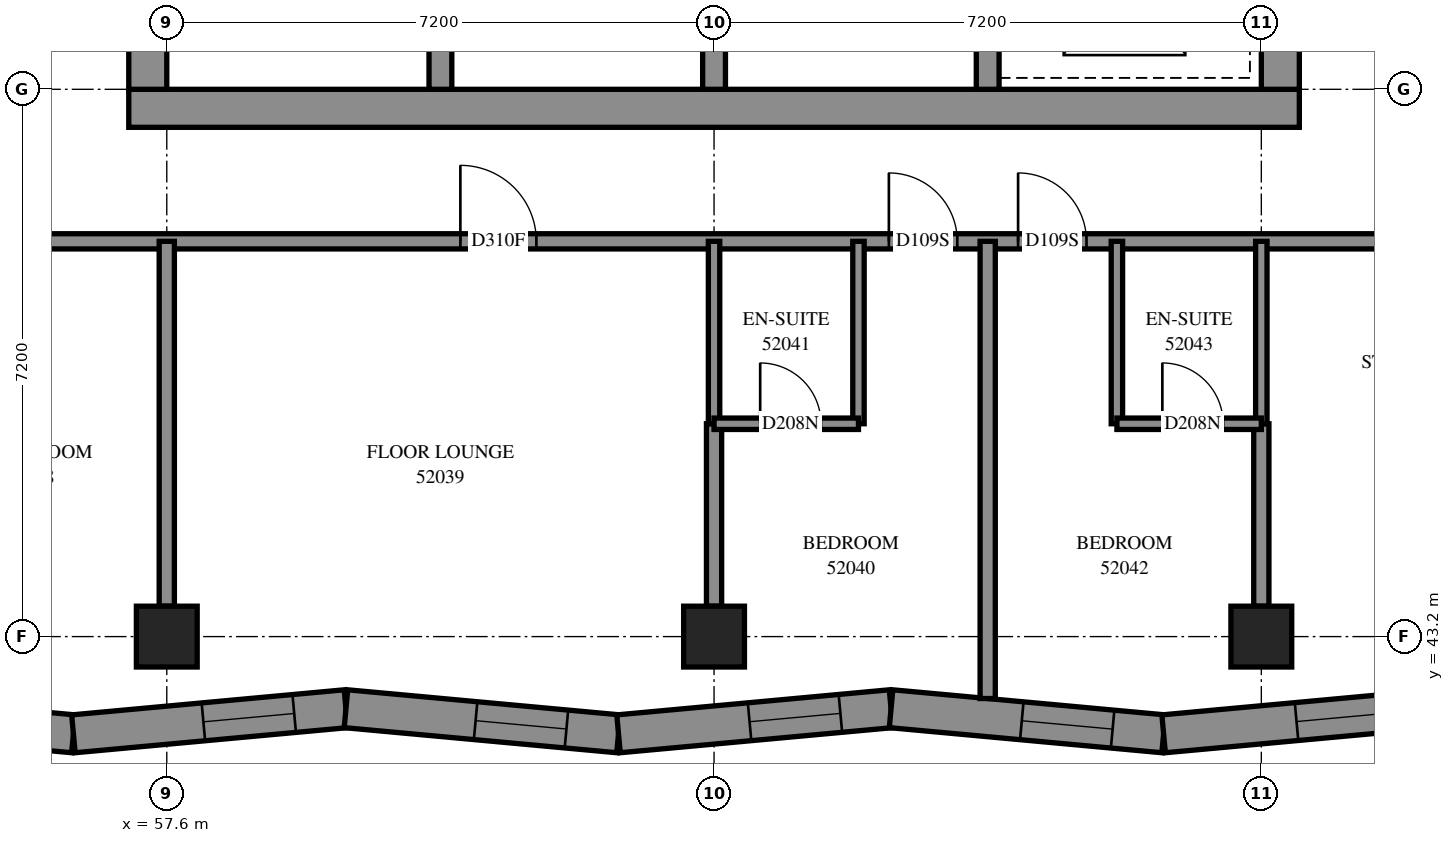
"""IFC4 building model, lengths in metres.
Left out: names, types, materials, properties, quantities, classifications, styles, units other than length and angle.
Written with IfcOpenShell. Run it as: python <this file> out.ifc"""

import sys

from ifc_helpers import new_model, si_unit, direction, frame, frame_2d, origin, origin_2d, place, context, subcontext, project, spatial, polyline, rectangle, outline, extrude, element, fill, save


model = new_model("IFC4")
c1 = context("Model", 3, precision=1e-05, world=origin(), true_north=direction((0.0, 1.0)))
c2 = subcontext(c1, "Body", "Model", "MODEL_VIEW")
j1 = project(units=[si_unit("LENGTHUNIT", "METRE"), si_unit("PLANEANGLEUNIT", "RADIAN")], contexts=[c1])
p1 = place(None, origin())
s1 = spatial("IfcSite", under=j1, at=p1, CompositionType="ELEMENT")
p2 = place(p1, origin())
s2 = spatial("IfcBuilding", under=s1, at=p2, CompositionType="ELEMENT")
p3 = place(p2, frame((0.0, 0.0, 193.0)))
s3 = spatial("IfcBuildingStorey", under=s2, at=p3, CompositionType="ELEMENT", Elevation=193.0)
for number, where, z_axis, x_axis in (
    (1, (57.6, 43.2, 0.0), (0.0, 0.0, 1.0), (1.0, 0.0, 0.0)),
    (2, (64.8, 43.2, 0.0), (0.0, 0.0, 1.0), (1.0, 0.0, 0.0)),
    (3, (72.0, 43.2, 0.0), (0.0, 0.0, 1.0), (1.0, 0.0, 0.0)),
):
    element("IfcColumn", number, at=place(p3, frame(where, z_axis=z_axis, x_axis=x_axis)), inside=s3, PredefinedType="COLUMN", context=c2, shape_type="SweptSolid", body=[
        extrude(rectangle(XDim=0.8, YDim=0.8, at=origin_2d()), origin(), (0.0, 0.0, 1.0), 3.1),
    ])
p4 = place(p3, frame((57.1, 50.15, -0.3), z_axis=(0.0, 0.0, 1.0), x_axis=(1.0, 0.0, 0.0)))
e4 = element("IfcWall", 4, at=p4, inside=s3, PredefinedType="SHEAR", context=c2, shape_type="SweptSolid", body=[
    extrude(rectangle(XDim=15.4, YDim=0.5, at=frame_2d((7.7, 0.0))), origin(), (0.0, 0.0, 1.0), 2.7),
])
p5 = place(p3, frame((57.35, 50.4, -0.3), z_axis=(0.0, 0.0, 1.0), x_axis=(0.0, 1.0, 0.0)))
e5 = element("IfcWall", 5, at=p5, inside=s3, PredefinedType="SHEAR", context=c2, shape_type="SweptSolid", body=[
    extrude(rectangle(XDim=14.4, YDim=0.5, at=frame_2d((7.2, 0.0))), origin(), (0.0, 0.0, 1.0), 2.7),
])
p6 = place(p5, frame((4.55, 0.0, 0.3)))
e6 = element("IfcOpeningElement", 6, at=p6, cuts=e5, PredefinedType="OPENING", context=c2, shape_type="SweptSolid", body=[
    extrude(rectangle(XDim=1.1, YDim=2.1, at=frame_2d((0.55, 1.05))), frame((0.0, 0.26, 0.0), z_axis=(0.0, -1.0, 0.0), x_axis=(1.0, 0.0, 0.0)), (0.0, 0.0, 1.0), 0.52),
])
p7 = place(p5, frame((11.35, 0.0, 0.3)))
e7 = element("IfcOpeningElement", 7, at=p7, cuts=e5, PredefinedType="OPENING", context=c2, shape_type="SweptSolid", body=[
    extrude(rectangle(XDim=1.1, YDim=2.1, at=frame_2d((0.55, 1.05))), frame((0.0, 0.26, 0.0), z_axis=(0.0, -1.0, 0.0), x_axis=(1.0, 0.0, 0.0)), (0.0, 0.0, 1.0), 0.52),
])
p8 = place(p3, frame((72.25, 50.4, -0.3), z_axis=(0.0, 0.0, 1.0), x_axis=(0.0, 1.0, 0.0)))
e8 = element("IfcWall", 8, at=p8, inside=s3, PredefinedType="SHEAR", context=c2, shape_type="SweptSolid", body=[
    extrude(rectangle(XDim=14.4, YDim=0.5, at=frame_2d((7.2, 0.0))), origin(), (0.0, 0.0, 1.0), 2.7),
])
p9 = place(p8, frame((4.55, 0.0, 0.3)))
e9 = element("IfcOpeningElement", 9, at=p9, cuts=e8, PredefinedType="OPENING", context=c2, shape_type="SweptSolid", body=[
    extrude(rectangle(XDim=1.1, YDim=2.1, at=frame_2d((0.55, 1.05))), frame((0.0, 0.26, 0.0), z_axis=(0.0, -1.0, 0.0), x_axis=(1.0, 0.0, 0.0)), (0.0, 0.0, 1.0), 0.52),
])
p10 = place(p8, frame((11.35, 0.0, 0.3)))
e10 = element("IfcOpeningElement", 10, at=p10, cuts=e8, PredefinedType="OPENING", context=c2, shape_type="SweptSolid", body=[
    extrude(rectangle(XDim=1.1, YDim=2.1, at=frame_2d((0.55, 1.05))), frame((0.0, 0.26, 0.0), z_axis=(0.0, -1.0, 0.0), x_axis=(1.0, 0.0, 0.0)), (0.0, 0.0, 1.0), 0.52),
])
for number, where, z_axis, x_axis in (
    (11, (61.2, 50.4, 0.0), (0.0, 0.0, 1.0), (0.0, 1.0, 0.0)),
    (12, (64.8, 50.4, 0.0), (0.0, 0.0, 1.0), (0.0, 1.0, 0.0)),
    (13, (68.4, 50.4, 0.0), (0.0, 0.0, 1.0), (0.0, 1.0, 0.0)),
):
    element("IfcWall", number, at=place(p3, frame(where, z_axis=z_axis, x_axis=x_axis)), inside=s3, PredefinedType="SOLIDWALL", context=c2, shape_type="SweptSolid", body=[
        extrude(rectangle(XDim=3.3, YDim=0.3, at=frame_2d((1.65, 0.0))), origin(), (0.0, 0.0, 1.0), 3.1),
    ])
p11 = place(p3, frame((52.765, 42.253, 0.0), z_axis=(0.0, 0.0, 1.0), x_axis=(0.9957941627, -0.0916186959, 0.0)))
e14 = element("IfcWall", 14, at=p11, inside=s3, PredefinedType="SOLIDWALL", context=c2, shape_type="SweptSolid", body=[
    extrude(outline(polyline([(0.044, -0.25), (3.644, -0.25), (3.599, 0.25), (-0.044, 0.25), (0.044, -0.25)])), origin(), (0.0, 0.0, 1.0), 3.1),
])
p12 = place(p11, frame((1.719, 0.0, 0.45)))
e15 = element("IfcOpeningElement", 15, at=p12, cuts=e14, PredefinedType="OPENING", context=c2, shape_type="SweptSolid", body=[
    extrude(rectangle(XDim=1.2, YDim=2.5, at=frame_2d((0.6, 1.25))), frame((0.0, 0.26, 0.0), z_axis=(0.0, -1.0, 0.0), x_axis=(1.0, 0.0, 0.0)), (0.0, 0.0, 1.0), 0.52),
])
p13 = place(p3, frame((56.371, 41.921, 0.0), z_axis=(0.0, 0.0, 1.0), x_axis=(0.9957917474, 0.0916449443, 0.0)))
e16 = element("IfcWall", 16, at=p13, inside=s3, PredefinedType="SOLIDWALL", context=c2, shape_type="SweptSolid", body=[
    extrude(outline(polyline([(-0.023, -0.25), (3.578, -0.25), (3.624, 0.25), (0.023, 0.25), (-0.023, -0.25)])), origin(), (0.0, 0.0, 1.0), 3.1),
])
p14 = place(p13, frame((1.717, 0.0, 0.45)))
e17 = element("IfcOpeningElement", 17, at=p14, cuts=e16, PredefinedType="OPENING", context=c2, shape_type="SweptSolid", body=[
    extrude(rectangle(XDim=1.2, YDim=2.5, at=frame_2d((0.6, 1.25))), frame((0.0, 0.26, 0.0), z_axis=(0.0, -1.0, 0.0), x_axis=(1.0, 0.0, 0.0)), (0.0, 0.0, 1.0), 0.52),
])
p15 = place(p3, frame((59.957, 42.251, 0.0), z_axis=(0.0, 0.0, 1.0), x_axis=(0.9957917474, -0.0916449443, 0.0)))
e18 = element("IfcWall", 18, at=p15, inside=s3, PredefinedType="SOLIDWALL", context=c2, shape_type="SweptSolid", body=[
    extrude(outline(polyline([(0.023, -0.25), (3.624, -0.25), (3.578, 0.25), (-0.023, 0.25), (0.023, -0.25)])), origin(), (0.0, 0.0, 1.0), 3.1),
])
p16 = place(p15, frame((1.713, 0.0, 0.45)))
e19 = element("IfcOpeningElement", 19, at=p16, cuts=e18, PredefinedType="OPENING", context=c2, shape_type="SweptSolid", body=[
    extrude(rectangle(XDim=1.2, YDim=2.5, at=frame_2d((0.6, 1.25))), frame((0.0, 0.26, 0.0), z_axis=(0.0, -1.0, 0.0), x_axis=(1.0, 0.0, 0.0)), (0.0, 0.0, 1.0), 0.52),
])
p17 = place(p3, frame((63.543, 41.921, 0.0), z_axis=(0.0, 0.0, 1.0), x_axis=(0.9957919806, 0.09164241, 0.0)))
e20 = element("IfcWall", 20, at=p17, inside=s3, PredefinedType="SOLIDWALL", context=c2, shape_type="SweptSolid", body=[
    extrude(outline(polyline([(-0.023, -0.25), (3.578, -0.25), (3.624, 0.25), (0.023, 0.25), (-0.023, -0.25)])), origin(), (0.0, 0.0, 1.0), 3.1),
])
p18 = place(p17, frame((1.732, 0.0, 0.45)))
e21 = element("IfcOpeningElement", 21, at=p18, cuts=e20, PredefinedType="OPENING", context=c2, shape_type="SweptSolid", body=[
    extrude(rectangle(XDim=1.2, YDim=2.5, at=frame_2d((0.6, 1.25))), frame((0.0, 0.26, 0.0), z_axis=(0.0, -1.0, 0.0), x_axis=(1.0, 0.0, 0.0)), (0.0, 0.0, 1.0), 0.52),
])
p19 = place(p3, frame((67.129, 42.251, 0.0), z_axis=(0.0, 0.0, 1.0), x_axis=(0.9957917474, -0.0916449443, 0.0)))
e22 = element("IfcWall", 22, at=p19, inside=s3, PredefinedType="SOLIDWALL", context=c2, shape_type="SweptSolid", body=[
    extrude(outline(polyline([(0.023, -0.25), (3.624, -0.25), (3.578, 0.25), (-0.023, 0.25), (0.023, -0.25)])), origin(), (0.0, 0.0, 1.0), 3.1),
])
p20 = place(p19, frame((1.727, 0.0, 0.45)))
e23 = element("IfcOpeningElement", 23, at=p20, cuts=e22, PredefinedType="OPENING", context=c2, shape_type="SweptSolid", body=[
    extrude(rectangle(XDim=1.2, YDim=2.5, at=frame_2d((0.6, 1.25))), frame((0.0, 0.26, 0.0), z_axis=(0.0, -1.0, 0.0), x_axis=(1.0, 0.0, 0.0)), (0.0, 0.0, 1.0), 0.52),
])
p21 = place(p3, frame((70.714, 41.921, 0.0), z_axis=(0.0, 0.0, 1.0), x_axis=(0.9957941627, 0.0916186959, 0.0)))
e24 = element("IfcWall", 24, at=p21, inside=s3, PredefinedType="SOLIDWALL", context=c2, shape_type="SweptSolid", body=[
    extrude(outline(polyline([(-0.023, -0.25), (3.578, -0.25), (3.665, 0.25), (0.023, 0.25), (-0.023, -0.25)])), origin(), (0.0, 0.0, 1.0), 3.1),
])
p22 = place(p21, frame((1.756, 0.0, 0.45)))
e25 = element("IfcOpeningElement", 25, at=p22, cuts=e24, PredefinedType="OPENING", context=c2, shape_type="SweptSolid", body=[
    extrude(rectangle(XDim=1.2, YDim=2.5, at=frame_2d((0.6, 1.25))), frame((0.0, 0.26, 0.0), z_axis=(0.0, -1.0, 0.0), x_axis=(1.0, 0.0, 0.0)), (0.0, 0.0, 1.0), 0.52),
])
p23 = place(p3, frame((55.6, 48.4, 0.0), z_axis=(0.0, 0.0, 1.0), x_axis=(1.0, 0.0, 0.0)))
e26 = element("IfcWall", 26, at=p23, inside=s3, PredefinedType="PARTITIONING", context=c2, shape_type="SweptSolid", body=[
    extrude(rectangle(XDim=18.4, YDim=0.2, at=frame_2d((9.2, 0.0))), origin(), (0.0, 0.0, 1.0), 3.1),
])
p24 = place(p23, frame((5.862, 0.0, 0.0)))
e27 = element("IfcOpeningElement", 27, at=p24, cuts=e26, PredefinedType="OPENING", context=c2, shape_type="SweptSolid", body=[
    extrude(rectangle(XDim=1.0, YDim=2.1, at=frame_2d((0.5, 1.05))), frame((0.0, 0.11, 0.0), z_axis=(0.0, -1.0, 0.0), x_axis=(1.0, 0.0, 0.0)), (0.0, 0.0, 1.0), 0.22),
])
p25 = place(p23, frame((11.5, 0.0, 0.0)))
e28 = element("IfcOpeningElement", 28, at=p25, cuts=e26, PredefinedType="OPENING", context=c2, shape_type="SweptSolid", body=[
    extrude(rectangle(XDim=0.9, YDim=2.1, at=frame_2d((0.45, 1.05))), frame((0.0, 0.11, 0.0), z_axis=(0.0, -1.0, 0.0), x_axis=(1.0, 0.0, 0.0)), (0.0, 0.0, 1.0), 0.22),
])
p26 = place(p23, frame((13.2, 0.0, 0.0)))
e29 = element("IfcOpeningElement", 29, at=p26, cuts=e26, PredefinedType="OPENING", context=c2, shape_type="SweptSolid", body=[
    extrude(rectangle(XDim=0.9, YDim=2.1, at=frame_2d((0.45, 1.05))), frame((0.0, 0.11, 0.0), z_axis=(0.0, -1.0, 0.0), x_axis=(1.0, 0.0, 0.0)), (0.0, 0.0, 1.0), 0.22),
])
p27 = place(p3, frame((68.4, 42.385, 0.0), z_axis=(0.0, 0.0, 1.0), x_axis=(0.0, 1.0, 0.0)))
e30 = element("IfcWall", 30, at=p27, inside=s3, PredefinedType="PARTITIONING", context=c2, shape_type="SweptSolid", body=[
    extrude(rectangle(XDim=6.015, YDim=0.2, at=frame_2d((3.007, 0.0))), origin(), (0.0, 0.0, 1.0), 3.1),
])
p28 = place(p3, frame((57.6, 43.6, 0.0), z_axis=(0.0, 0.0, 1.0), x_axis=(0.0, 1.0, 0.0)))
e31 = element("IfcWall", 31, at=p28, inside=s3, PredefinedType="PARTITIONING", context=c2, shape_type="SweptSolid", body=[
    extrude(rectangle(XDim=4.8, YDim=0.2, at=frame_2d((2.4, 0.0))), origin(), (0.0, 0.0, 1.0), 3.1),
])
p29 = place(p3, frame((64.8, 43.6, 0.0), z_axis=(0.0, 0.0, 1.0), x_axis=(0.0, 1.0, 0.0)))
e32 = element("IfcWall", 32, at=p29, inside=s3, PredefinedType="PARTITIONING", context=c2, shape_type="SweptSolid", body=[
    extrude(rectangle(XDim=2.4, YDim=0.2, at=frame_2d((1.2, 0.0))), origin(), (0.0, 0.0, 1.0), 3.1),
])
for number, where, z_axis, x_axis in (
    (33, (66.7, 46.0, 0.0), (0.0, 0.0, 1.0), (0.0, 1.0, 0.0)),
    (34, (64.8, 46.0, 0.0), (0.0, 0.0, 1.0), (0.0, 1.0, 0.0)),
    (35, (70.1, 46.0, 0.0), (0.0, 0.0, 1.0), (0.0, 1.0, 0.0)),
):
    element("IfcWall", number, at=place(p3, frame(where, z_axis=z_axis, x_axis=x_axis)), inside=s3, PredefinedType="PARTITIONING", context=c2, shape_type="SweptSolid", body=[
        extrude(rectangle(XDim=2.4, YDim=0.15, at=frame_2d((1.2, 0.0))), origin(), (0.0, 0.0, 1.0), 3.1),
    ])
p30 = place(p3, frame((72.0, 43.6, 0.0), z_axis=(0.0, 0.0, 1.0), x_axis=(0.0, 1.0, 0.0)))
e36 = element("IfcWall", 36, at=p30, inside=s3, PredefinedType="PARTITIONING", context=c2, shape_type="SweptSolid", body=[
    extrude(rectangle(XDim=2.4, YDim=0.2, at=frame_2d((1.2, 0.0))), origin(), (0.0, 0.0, 1.0), 3.1),
])
p31 = place(p3, frame((72.0, 46.0, 0.0), z_axis=(0.0, 0.0, 1.0), x_axis=(0.0, 1.0, 0.0)))
e37 = element("IfcWall", 37, at=p31, inside=s3, PredefinedType="PARTITIONING", context=c2, shape_type="SweptSolid", body=[
    extrude(rectangle(XDim=2.4, YDim=0.15, at=frame_2d((1.2, 0.0))), origin(), (0.0, 0.0, 1.0), 3.1),
])
p32 = place(p3, frame((64.8, 46.0, 0.0), z_axis=(0.0, 0.0, 1.0), x_axis=(1.0, 0.0, 0.0)))
e38 = element("IfcWall", 38, at=p32, inside=s3, PredefinedType="PARTITIONING", context=c2, shape_type="SweptSolid", body=[
    extrude(rectangle(XDim=1.9, YDim=0.15, at=frame_2d((0.95, 0.0))), origin(), (0.0, 0.0, 1.0), 3.1),
])
p33 = place(p32, frame((0.607, 0.0, 0.0)))
e39 = element("IfcOpeningElement", 39, at=p33, cuts=e38, PredefinedType="OPENING", context=c2, shape_type="SweptSolid", body=[
    extrude(rectangle(XDim=0.8, YDim=2.1, at=frame_2d((0.4, 1.05))), frame((0.0, 0.085, 0.0), z_axis=(0.0, -1.0, 0.0), x_axis=(1.0, 0.0, 0.0)), (0.0, 0.0, 1.0), 0.17),
])
p34 = place(p3, frame((70.1, 46.0, 0.0), z_axis=(0.0, 0.0, 1.0), x_axis=(1.0, 0.0, 0.0)))
e40 = element("IfcWall", 40, at=p34, inside=s3, PredefinedType="PARTITIONING", context=c2, shape_type="SweptSolid", body=[
    extrude(rectangle(XDim=1.9, YDim=0.15, at=frame_2d((0.95, 0.0))), origin(), (0.0, 0.0, 1.0), 3.1),
])
p35 = place(p34, frame((0.598, 0.0, 0.0)))
e41 = element("IfcOpeningElement", 41, at=p35, cuts=e40, PredefinedType="OPENING", context=c2, shape_type="SweptSolid", body=[
    extrude(rectangle(XDim=0.8, YDim=2.1, at=frame_2d((0.4, 1.05))), frame((0.0, 0.085, 0.0), z_axis=(0.0, -1.0, 0.0), x_axis=(1.0, 0.0, 0.0)), (0.0, 0.0, 1.0), 0.17),
])
p36 = place(p14, origin())
e42 = element("IfcWindow", 42, at=p36, inside=s3, PartitioningType="SINGLE_PANEL", PredefinedType="WINDOW", context=c2, shape_type="SweptSolid", body=[
    extrude(rectangle(XDim=1.2, YDim=2.5, at=frame_2d((0.6, 1.25))), frame((0.0, 0.18, 0.0), z_axis=(0.0, -1.0, 0.0), x_axis=(1.0, 0.0, 0.0)), (0.0, 0.0, 1.0), 0.06),
])
fill(e17, e42)
p37 = place(p16, origin())
e43 = element("IfcWindow", 43, at=p37, inside=s3, PartitioningType="SINGLE_PANEL", PredefinedType="WINDOW", context=c2, shape_type="SweptSolid", body=[
    extrude(rectangle(XDim=1.2, YDim=2.5, at=frame_2d((0.6, 1.25))), frame((0.0, 0.18, 0.0), z_axis=(0.0, -1.0, 0.0), x_axis=(1.0, 0.0, 0.0)), (0.0, 0.0, 1.0), 0.06),
])
fill(e19, e43)
p38 = place(p18, origin())
e44 = element("IfcWindow", 44, at=p38, inside=s3, PartitioningType="SINGLE_PANEL", PredefinedType="WINDOW", context=c2, shape_type="SweptSolid", body=[
    extrude(rectangle(XDim=1.2, YDim=2.5, at=frame_2d((0.6, 1.25))), frame((0.0, 0.18, 0.0), z_axis=(0.0, -1.0, 0.0), x_axis=(1.0, 0.0, 0.0)), (0.0, 0.0, 1.0), 0.06),
])
fill(e21, e44)
p39 = place(p20, origin())
e45 = element("IfcWindow", 45, at=p39, inside=s3, PartitioningType="SINGLE_PANEL", PredefinedType="WINDOW", context=c2, shape_type="SweptSolid", body=[
    extrude(rectangle(XDim=1.2, YDim=2.5, at=frame_2d((0.6, 1.25))), frame((0.0, 0.18, 0.0), z_axis=(0.0, -1.0, 0.0), x_axis=(1.0, 0.0, 0.0)), (0.0, 0.0, 1.0), 0.06),
])
fill(e23, e45)
p40 = place(p22, origin())
e46 = element("IfcWindow", 46, at=p40, inside=s3, PartitioningType="SINGLE_PANEL", PredefinedType="WINDOW", context=c2, shape_type="SweptSolid", body=[
    extrude(rectangle(XDim=1.2, YDim=2.5, at=frame_2d((0.6, 1.25))), frame((0.0, 0.18, 0.0), z_axis=(0.0, -1.0, 0.0), x_axis=(1.0, 0.0, 0.0)), (0.0, 0.0, 1.0), 0.06),
])
fill(e25, e46)
p41 = place(p24, origin())
e47 = element("IfcDoor", 47, at=p41, inside=s3, OperationType="SINGLE_SWING_LEFT", PredefinedType="DOOR", context=c2, shape_type="SweptSolid", body=[
    extrude(rectangle(XDim=1.0, YDim=2.1, at=frame_2d((0.5, 1.05))), frame((0.0, 0.025, 0.0), z_axis=(0.0, -1.0, 0.0), x_axis=(1.0, 0.0, 0.0)), (0.0, 0.0, 1.0), 0.05),
])
fill(e27, e47)
p42 = place(p25, origin())
e48 = element("IfcDoor", 48, at=p42, inside=s3, OperationType="SINGLE_SWING_LEFT", PredefinedType="DOOR", context=c2, shape_type="SweptSolid", body=[
    extrude(rectangle(XDim=0.9, YDim=2.1, at=frame_2d((0.45, 1.05))), frame((0.0, 0.025, 0.0), z_axis=(0.0, -1.0, 0.0), x_axis=(1.0, 0.0, 0.0)), (0.0, 0.0, 1.0), 0.05),
])
fill(e28, e48)
p43 = place(p33, origin())
e49 = element("IfcDoor", 49, at=p43, inside=s3, OperationType="SINGLE_SWING_RIGHT", PredefinedType="DOOR", context=c2, shape_type="SweptSolid", body=[
    extrude(rectangle(XDim=0.8, YDim=2.1, at=frame_2d((0.4, 1.05))), frame((0.0, 0.025, 0.0), z_axis=(0.0, -1.0, 0.0), x_axis=(1.0, 0.0, 0.0)), (0.0, 0.0, 1.0), 0.05),
])
fill(e39, e49)
p44 = place(p26, origin())
e50 = element("IfcDoor", 50, at=p44, inside=s3, OperationType="SINGLE_SWING_RIGHT", PredefinedType="DOOR", context=c2, shape_type="SweptSolid", body=[
    extrude(rectangle(XDim=0.9, YDim=2.1, at=frame_2d((0.45, 1.05))), frame((0.0, 0.025, 0.0), z_axis=(0.0, -1.0, 0.0), x_axis=(1.0, 0.0, 0.0)), (0.0, 0.0, 1.0), 0.05),
])
fill(e29, e50)
p45 = place(p35, origin())
e51 = element("IfcDoor", 51, at=p45, inside=s3, OperationType="SINGLE_SWING_RIGHT", PredefinedType="DOOR", context=c2, shape_type="SweptSolid", body=[
    extrude(rectangle(XDim=0.8, YDim=2.1, at=frame_2d((0.4, 1.05))), frame((0.0, 0.025, 0.0), z_axis=(0.0, -1.0, 0.0), x_axis=(1.0, 0.0, 0.0)), (0.0, 0.0, 1.0), 0.05),
])
fill(e41, e51)
save(model, sys.argv[1])
